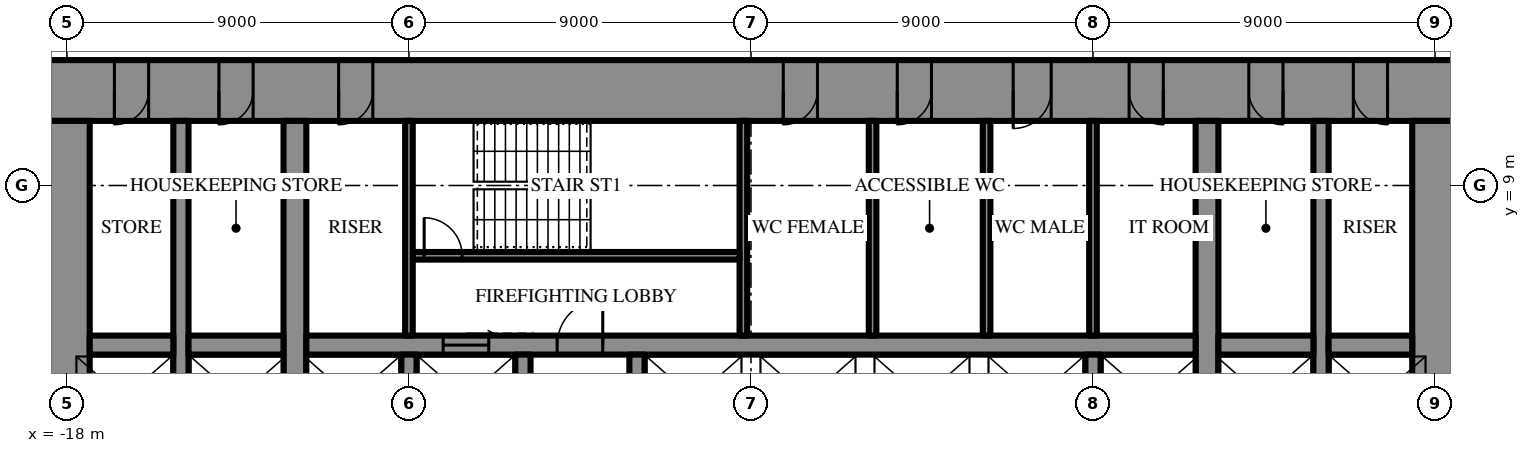
"""IFC4 building model, lengths in metres.
Left out: names, types, materials, properties, quantities, classifications, styles, units other than length and angle.
Written with IfcOpenShell. Run it as: python <this file> out.ifc"""

import sys

from ifc_helpers import new_model, si_unit, direction, frame, frame_2d, origin, place, context, subcontext, project, spatial, rectangle, extrude, element, fill, save


model = new_model("IFC4")
c1 = context("Model", 3, precision=1e-05, world=origin(), true_north=direction((0.0, 1.0)))
c2 = subcontext(c1, "Body", "Model", "MODEL_VIEW")
j1 = project(units=[si_unit("LENGTHUNIT", "METRE"), si_unit("PLANEANGLEUNIT", "RADIAN")], contexts=[c1])
p1 = place(None, origin())
s1 = spatial("IfcSite", under=j1, at=p1, CompositionType="ELEMENT")
p2 = place(p1, origin())
s2 = spatial("IfcBuilding", under=s1, at=p2, CompositionType="ELEMENT")
p3 = place(p2, frame((0.0, 0.0, 61.3)))
s3 = spatial("IfcBuildingStorey", under=s2, at=p3, CompositionType="ELEMENT", Elevation=61.3)
p4 = place(p3, frame((-18.6, 11.5, 0.0), z_axis=(0.0, 0.0, 1.0), x_axis=(1.0, 0.0, 0.0)))
e1 = element("IfcWall", 1, at=p4, inside=s3, PredefinedType="SHEAR", context=c2, shape_type="SweptSolid", body=[
    extrude(rectangle(XDim=37.2, YDim=1.6, at=frame_2d((18.6, 0.0))), origin(), (0.0, 0.0, 1.0), 4.2),
])
p5 = place(p4, frame((19.45, 0.0, 0.0)))
e2 = element("IfcOpeningElement", 2, at=p5, cuts=e1, PredefinedType="OPENING", context=c2, shape_type="SweptSolid", body=[
    extrude(rectangle(XDim=0.9, YDim=2.2, at=frame_2d((0.45, 1.1))), frame((0.0, 0.81, 0.0), z_axis=(0.0, -1.0, 0.0), x_axis=(1.0, 0.0, 0.0)), (0.0, 0.0, 1.0), 1.62),
])
p6 = place(p4, frame((22.45, 0.0, 0.0)))
e3 = element("IfcOpeningElement", 3, at=p6, cuts=e1, PredefinedType="OPENING", context=c2, shape_type="SweptSolid", body=[
    extrude(rectangle(XDim=0.9, YDim=2.2, at=frame_2d((0.45, 1.1))), frame((0.0, 0.81, 0.0), z_axis=(0.0, -1.0, 0.0), x_axis=(1.0, 0.0, 0.0)), (0.0, 0.0, 1.0), 1.62),
])
p7 = place(p4, frame((25.5, 0.0, 0.0)))
e4 = element("IfcOpeningElement", 4, at=p7, cuts=e1, PredefinedType="OPENING", context=c2, shape_type="SweptSolid", body=[
    extrude(rectangle(XDim=1.0, YDim=2.2, at=frame_2d((0.5, 1.1))), frame((0.0, 0.81, 0.0), z_axis=(0.0, -1.0, 0.0), x_axis=(1.0, 0.0, 0.0)), (0.0, 0.0, 1.0), 1.62),
])
p8 = place(p4, frame((1.85, 0.0, 0.0)))
e5 = element("IfcOpeningElement", 5, at=p8, cuts=e1, PredefinedType="OPENING", context=c2, shape_type="SweptSolid", body=[
    extrude(rectangle(XDim=0.9, YDim=2.2, at=frame_2d((0.45, 1.1))), frame((0.0, 0.81, 0.0), z_axis=(0.0, -1.0, 0.0), x_axis=(1.0, 0.0, 0.0)), (0.0, 0.0, 1.0), 1.62),
])
p9 = place(p4, frame((4.6, 0.0, 0.0)))
e6 = element("IfcOpeningElement", 6, at=p9, cuts=e1, PredefinedType="OPENING", context=c2, shape_type="SweptSolid", body=[
    extrude(rectangle(XDim=0.9, YDim=2.2, at=frame_2d((0.45, 1.1))), frame((0.0, 0.81, 0.0), z_axis=(0.0, -1.0, 0.0), x_axis=(1.0, 0.0, 0.0)), (0.0, 0.0, 1.0), 1.62),
])
p10 = place(p4, frame((7.75, 0.0, 0.0)))
e7 = element("IfcOpeningElement", 7, at=p10, cuts=e1, PredefinedType="OPENING", context=c2, shape_type="SweptSolid", body=[
    extrude(rectangle(XDim=0.9, YDim=2.2, at=frame_2d((0.45, 1.1))), frame((0.0, 0.81, 0.0), z_axis=(0.0, -1.0, 0.0), x_axis=(1.0, 0.0, 0.0)), (0.0, 0.0, 1.0), 1.62),
])
p11 = place(p4, frame((28.55, 0.0, 0.0)))
e8 = element("IfcOpeningElement", 8, at=p11, cuts=e1, PredefinedType="OPENING", context=c2, shape_type="SweptSolid", body=[
    extrude(rectangle(XDim=0.9, YDim=2.2, at=frame_2d((0.45, 1.1))), frame((0.0, 0.81, 0.0), z_axis=(0.0, -1.0, 0.0), x_axis=(1.0, 0.0, 0.0)), (0.0, 0.0, 1.0), 1.62),
])
p12 = place(p4, frame((31.7, 0.0, 0.0)))
e9 = element("IfcOpeningElement", 9, at=p12, cuts=e1, PredefinedType="OPENING", context=c2, shape_type="SweptSolid", body=[
    extrude(rectangle(XDim=0.9, YDim=2.2, at=frame_2d((0.45, 1.1))), frame((0.0, 0.81, 0.0), z_axis=(0.0, -1.0, 0.0), x_axis=(1.0, 0.0, 0.0)), (0.0, 0.0, 1.0), 1.62),
])
p13 = place(p4, frame((34.45, 0.0, 0.0)))
e10 = element("IfcOpeningElement", 10, at=p13, cuts=e1, PredefinedType="OPENING", context=c2, shape_type="SweptSolid", body=[
    extrude(rectangle(XDim=0.9, YDim=2.2, at=frame_2d((0.45, 1.1))), frame((0.0, 0.81, 0.0), z_axis=(0.0, -1.0, 0.0), x_axis=(1.0, 0.0, 0.0)), (0.0, 0.0, 1.0), 1.62),
])
p14 = place(p3, frame((18.0, -10.7, 0.0), z_axis=(0.0, 0.0, 1.0), x_axis=(0.0, 1.0, 0.0)))
e11 = element("IfcWall", 11, at=p14, inside=s3, PredefinedType="SHEAR", context=c2, shape_type="SweptSolid", body=[
    extrude(rectangle(XDim=21.4, YDim=1.2, at=frame_2d((10.7, 0.0))), origin(), (0.0, 0.0, 1.0), 4.2),
])
p15 = place(p14, frame((9.8, 0.0, 0.0)))
e12 = element("IfcOpeningElement", 12, at=p15, cuts=e11, PredefinedType="OPENING", context=c2, shape_type="SweptSolid", body=[
    extrude(rectangle(XDim=1.8, YDim=2.4, at=frame_2d((0.9, 1.2))), frame((0.0, 0.61, 0.0), z_axis=(0.0, -1.0, 0.0), x_axis=(1.0, 0.0, 0.0)), (0.0, 0.0, 1.0), 1.22),
])
p16 = place(p3, frame((-18.0, 10.7, 0.0), z_axis=(0.0, 0.0, 1.0), x_axis=(0.0, -1.0, 0.0)))
e13 = element("IfcWall", 13, at=p16, inside=s3, PredefinedType="SHEAR", context=c2, shape_type="SweptSolid", body=[
    extrude(rectangle(XDim=21.4, YDim=1.2, at=frame_2d((10.7, 0.0))), origin(), (0.0, 0.0, 1.0), 4.2),
])
p17 = place(p16, frame((9.8, 0.0, 0.0)))
e14 = element("IfcOpeningElement", 14, at=p17, cuts=e13, PredefinedType="OPENING", context=c2, shape_type="SweptSolid", body=[
    extrude(rectangle(XDim=1.8, YDim=2.4, at=frame_2d((0.9, 1.2))), frame((0.0, 0.61, 0.0), z_axis=(0.0, -1.0, 0.0), x_axis=(1.0, 0.0, 0.0)), (0.0, 0.0, 1.0), 1.22),
])
p18 = place(p3, frame((12.0, -10.7, 0.0), z_axis=(0.0, 0.0, 1.0), x_axis=(0.0, 1.0, 0.0)))
e15 = element("IfcWall", 15, at=p18, inside=s3, PredefinedType="SHEAR", context=c2, shape_type="SweptSolid", body=[
    extrude(rectangle(XDim=21.4, YDim=0.6, at=frame_2d((10.7, 0.0))), origin(), (0.0, 0.0, 1.0), 4.2),
])
p19 = place(p18, frame((9.8, 0.0, 0.0)))
e16 = element("IfcOpeningElement", 16, at=p19, cuts=e15, PredefinedType="OPENING", context=c2, shape_type="SweptSolid", body=[
    extrude(rectangle(XDim=1.8, YDim=2.4, at=frame_2d((0.9, 1.2))), frame((0.0, 0.31, 0.0), z_axis=(0.0, -1.0, 0.0), x_axis=(1.0, 0.0, 0.0)), (0.0, 0.0, 1.0), 0.62),
])
p20 = place(p3, frame((-12.0, -10.7, 0.0), z_axis=(0.0, 0.0, 1.0), x_axis=(0.0, 1.0, 0.0)))
e17 = element("IfcWall", 17, at=p20, inside=s3, PredefinedType="SHEAR", context=c2, shape_type="SweptSolid", body=[
    extrude(rectangle(XDim=21.4, YDim=0.6, at=frame_2d((10.7, 0.0))), origin(), (0.0, 0.0, 1.0), 4.2),
])
p21 = place(p20, frame((9.8, 0.0, 0.0)))
e18 = element("IfcOpeningElement", 18, at=p21, cuts=e17, PredefinedType="OPENING", context=c2, shape_type="SweptSolid", body=[
    extrude(rectangle(XDim=1.8, YDim=2.4, at=frame_2d((0.9, 1.2))), frame((0.0, 0.31, 0.0), z_axis=(0.0, -1.0, 0.0), x_axis=(1.0, 0.0, 0.0)), (0.0, 0.0, 1.0), 0.62),
])
p22 = place(p3, frame((15.0, -10.7, 0.0), z_axis=(0.0, 0.0, 1.0), x_axis=(0.0, 1.0, 0.0)))
e19 = element("IfcWall", 19, at=p22, inside=s3, PredefinedType="SHEAR", context=c2, shape_type="SweptSolid", body=[
    extrude(rectangle(XDim=21.4, YDim=0.4, at=frame_2d((10.7, 0.0))), origin(), (0.0, 0.0, 1.0), 4.2),
])
p23 = place(p22, frame((9.8, 0.0, 0.0)))
e20 = element("IfcOpeningElement", 20, at=p23, cuts=e19, PredefinedType="OPENING", context=c2, shape_type="SweptSolid", body=[
    extrude(rectangle(XDim=1.8, YDim=2.4, at=frame_2d((0.9, 1.2))), frame((0.0, 0.21, 0.0), z_axis=(0.0, -1.0, 0.0), x_axis=(1.0, 0.0, 0.0)), (0.0, 0.0, 1.0), 0.42),
])
p24 = place(p3, frame((-15.0, -10.7, 0.0), z_axis=(0.0, 0.0, 1.0), x_axis=(0.0, 1.0, 0.0)))
e21 = element("IfcWall", 21, at=p24, inside=s3, PredefinedType="SHEAR", context=c2, shape_type="SweptSolid", body=[
    extrude(rectangle(XDim=21.4, YDim=0.4, at=frame_2d((10.7, 0.0))), origin(), (0.0, 0.0, 1.0), 4.2),
])
p25 = place(p24, frame((9.8, 0.0, 0.0)))
e22 = element("IfcOpeningElement", 22, at=p25, cuts=e21, PredefinedType="OPENING", context=c2, shape_type="SweptSolid", body=[
    extrude(rectangle(XDim=1.8, YDim=2.4, at=frame_2d((0.9, 1.2))), frame((0.0, 0.21, 0.0), z_axis=(0.0, -1.0, 0.0), x_axis=(1.0, 0.0, 0.0)), (0.0, 0.0, 1.0), 0.42),
])
p26 = place(p3, frame((-17.4, 4.8, 0.0), z_axis=(0.0, 0.0, 1.0), x_axis=(1.0, 0.0, 0.0)))
e23 = element("IfcWall", 23, at=p26, inside=s3, PredefinedType="SHEAR", context=c2, shape_type="SweptSolid", body=[
    extrude(rectangle(XDim=2.2, YDim=0.5, at=frame_2d((1.1, 0.0))), origin(), (0.0, 0.0, 1.0), 4.2),
])
p27 = place(p3, frame((-14.8, 4.8, 0.0), z_axis=(0.0, 0.0, 1.0), x_axis=(1.0, 0.0, 0.0)))
e24 = element("IfcWall", 24, at=p27, inside=s3, PredefinedType="SHEAR", context=c2, shape_type="SweptSolid", body=[
    extrude(rectangle(XDim=2.5, YDim=0.5, at=frame_2d((1.25, 0.0))), origin(), (0.0, 0.0, 1.0), 4.2),
])
p28 = place(p3, frame((-11.7, 4.8, 0.0), z_axis=(0.0, 0.0, 1.0), x_axis=(1.0, 0.0, 0.0)))
e25 = element("IfcWall", 25, at=p28, inside=s3, PredefinedType="SHEAR", context=c2, shape_type="SweptSolid", body=[
    extrude(rectangle(XDim=23.4, YDim=0.5, at=frame_2d((11.7, 0.0))), origin(), (0.0, 0.0, 1.0), 4.2),
])
p29 = place(p28, frame((6.6, 0.0, 0.0)))
e26 = element("IfcOpeningElement", 26, at=p29, cuts=e25, PredefinedType="OPENING", context=c2, shape_type="SweptSolid", body=[
    extrude(rectangle(XDim=1.2, YDim=2.2, at=frame_2d((0.6, 1.1))), frame((0.0, 0.26, 0.0), z_axis=(0.0, -1.0, 0.0), x_axis=(1.0, 0.0, 0.0)), (0.0, 0.0, 1.0), 0.52),
])
p30 = place(p28, frame((3.6, 0.0, 0.0)))
e27 = element("IfcOpeningElement", 27, at=p30, cuts=e25, PredefinedType="OPENING", context=c2, shape_type="SweptSolid", body=[
    extrude(rectangle(XDim=1.2, YDim=2.2, at=frame_2d((0.6, 1.1))), frame((0.0, 0.26, 0.0), z_axis=(0.0, -1.0, 0.0), x_axis=(1.0, 0.0, 0.0)), (0.0, 0.0, 1.0), 0.52),
])
p31 = place(p3, frame((12.3, 4.8, 0.0), z_axis=(0.0, 0.0, 1.0), x_axis=(1.0, 0.0, 0.0)))
e28 = element("IfcWall", 28, at=p31, inside=s3, PredefinedType="SHEAR", context=c2, shape_type="SweptSolid", body=[
    extrude(rectangle(XDim=2.5, YDim=0.5, at=frame_2d((1.25, 0.0))), origin(), (0.0, 0.0, 1.0), 4.2),
])
p32 = place(p3, frame((15.2, 4.8, 0.0), z_axis=(0.0, 0.0, 1.0), x_axis=(1.0, 0.0, 0.0)))
e29 = element("IfcWall", 29, at=p32, inside=s3, PredefinedType="SHEAR", context=c2, shape_type="SweptSolid", body=[
    extrude(rectangle(XDim=2.2, YDim=0.5, at=frame_2d((1.1, 0.0))), origin(), (0.0, 0.0, 1.0), 4.2),
])
for number, where, z_axis, x_axis in (
    (30, (-9.0, 2.25, 0.0), (0.0, 0.0, 1.0), (0.0, 1.0, 0.0)),
    (31, (-6.0, 2.25, 0.0), (0.0, 0.0, 1.0), (0.0, 1.0, 0.0)),
    (32, (-3.0, 2.25, 0.0), (0.0, 0.0, 1.0), (0.0, 1.0, 0.0)),
    (33, (9.0, 2.25, 0.0), (0.0, 0.0, 1.0), (0.0, 1.0, 0.0)),
):
    element("IfcWall", number, at=place(p3, frame(where, z_axis=z_axis, x_axis=x_axis)), inside=s3, PredefinedType="SHEAR", context=c2, shape_type="SweptSolid", body=[
        extrude(rectangle(XDim=2.3, YDim=0.4, at=frame_2d((1.15, 0.0))), origin(), (0.0, 0.0, 1.0), 4.2),
    ])
p33 = place(p3, frame((-0.2, 5.05, 0.0), z_axis=(0.0, 0.0, 1.0), x_axis=(0.0, 1.0, 0.0)))
e34 = element("IfcWall", 34, at=p33, inside=s3, PredefinedType="SHEAR", context=c2, shape_type="SweptSolid", body=[
    extrude(rectangle(XDim=5.65, YDim=0.2, at=frame_2d((2.825, 0.0))), origin(), (0.0, 0.0, 1.0), 4.2),
])
p34 = place(p3, frame((-8.9, 7.15, 0.0), z_axis=(0.0, 0.0, 1.0), x_axis=(1.0, 0.0, 0.0)))
e35 = element("IfcWall", 35, at=p34, inside=s3, PredefinedType="SHEAR", context=c2, shape_type="SweptSolid", body=[
    extrude(rectangle(XDim=8.6, YDim=0.2, at=frame_2d((4.3, 0.0))), origin(), (0.0, 0.0, 1.0), 4.2),
])
p35 = place(p34, frame((0.3, 0.0, 0.0)))
e36 = element("IfcOpeningElement", 36, at=p35, cuts=e35, PredefinedType="OPENING", context=c2, shape_type="SweptSolid", body=[
    extrude(rectangle(XDim=1.0, YDim=2.2, at=frame_2d((0.5, 1.1))), frame((0.0, 0.11, 0.0), z_axis=(0.0, -1.0, 0.0), x_axis=(1.0, 0.0, 0.0)), (0.0, 0.0, 1.0), 0.22),
])
for number, where, z_axis, x_axis in (
    (37, (-9.0, 5.05, 0.0), (0.0, 0.0, 1.0), (0.0, 1.0, 0.0)),
    (38, (9.0, 5.05, 0.0), (0.0, 0.0, 1.0), (0.0, 1.0, 0.0)),
    (39, (3.2, 5.05, 0.0), (0.0, 0.0, 1.0), (0.0, 1.0, 0.0)),
    (40, (6.2, 5.05, 0.0), (0.0, 0.0, 1.0), (0.0, 1.0, 0.0)),
):
    element("IfcWall", number, at=place(p3, frame(where, z_axis=z_axis, x_axis=x_axis)), inside=s3, PredefinedType="PARTITIONING", context=c2, shape_type="SweptSolid", body=[
        extrude(rectangle(XDim=5.65, YDim=0.2, at=frame_2d((2.825, 0.0))), origin(), (0.0, 0.0, 1.0), 4.0),
    ])
p36 = place(p29, origin())
e41 = element("IfcDoor", 41, at=p36, inside=s3, OperationType="SINGLE_SWING_LEFT", PredefinedType="DOOR", context=c2, shape_type="SweptSolid", body=[
    extrude(rectangle(XDim=1.2, YDim=2.2, at=frame_2d((0.6, 1.1))), frame((0.0, 0.025, 0.0), z_axis=(0.0, -1.0, 0.0), x_axis=(1.0, 0.0, 0.0)), (0.0, 0.0, 1.0), 0.05),
])
fill(e26, e41)
p37 = place(p35, origin())
e42 = element("IfcDoor", 42, at=p37, inside=s3, OperationType="SINGLE_SWING_RIGHT", PredefinedType="DOOR", context=c2, shape_type="SweptSolid", body=[
    extrude(rectangle(XDim=1.0, YDim=2.2, at=frame_2d((0.5, 1.1))), frame((0.0, 0.025, 0.0), z_axis=(0.0, -1.0, 0.0), x_axis=(1.0, 0.0, 0.0)), (0.0, 0.0, 1.0), 0.05),
])
fill(e36, e42)
p38 = place(p5, frame((0.9, 0.0, 0.0), z_axis=(0.0, 0.0, 1.0), x_axis=(-1.0, 0.0, 0.0)))
e43 = element("IfcDoor", 43, at=p38, inside=s3, OperationType="SINGLE_SWING_LEFT", PredefinedType="DOOR", context=c2, shape_type="SweptSolid", body=[
    extrude(rectangle(XDim=0.9, YDim=2.2, at=frame_2d((0.45, 1.1))), frame((0.0, 0.025, 0.0), z_axis=(0.0, -1.0, 0.0), x_axis=(1.0, 0.0, 0.0)), (0.0, 0.0, 1.0), 0.05),
])
fill(e2, e43)
p39 = place(p6, frame((0.9, 0.0, 0.0), z_axis=(0.0, 0.0, 1.0), x_axis=(-1.0, 0.0, 0.0)))
e44 = element("IfcDoor", 44, at=p39, inside=s3, OperationType="SINGLE_SWING_LEFT", PredefinedType="DOOR", context=c2, shape_type="SweptSolid", body=[
    extrude(rectangle(XDim=0.9, YDim=2.2, at=frame_2d((0.45, 1.1))), frame((0.0, 0.025, 0.0), z_axis=(0.0, -1.0, 0.0), x_axis=(1.0, 0.0, 0.0)), (0.0, 0.0, 1.0), 0.05),
])
fill(e3, e44)
p40 = place(p7, frame((1.0, 0.0, 0.0), z_axis=(0.0, 0.0, 1.0), x_axis=(-1.0, 0.0, 0.0)))
e45 = element("IfcDoor", 45, at=p40, inside=s3, OperationType="SINGLE_SWING_LEFT", PredefinedType="DOOR", context=c2, shape_type="SweptSolid", body=[
    extrude(rectangle(XDim=1.0, YDim=2.2, at=frame_2d((0.5, 1.1))), frame((0.0, 0.025, 0.0), z_axis=(0.0, -1.0, 0.0), x_axis=(1.0, 0.0, 0.0)), (0.0, 0.0, 1.0), 0.05),
])
fill(e4, e45)
p41 = place(p8, frame((0.9, 0.0, 0.0), z_axis=(0.0, 0.0, 1.0), x_axis=(-1.0, 0.0, 0.0)))
e46 = element("IfcDoor", 46, at=p41, inside=s3, OperationType="SINGLE_SWING_LEFT", PredefinedType="DOOR", context=c2, shape_type="SweptSolid", body=[
    extrude(rectangle(XDim=0.9, YDim=2.2, at=frame_2d((0.45, 1.1))), frame((0.0, 0.025, 0.0), z_axis=(0.0, -1.0, 0.0), x_axis=(1.0, 0.0, 0.0)), (0.0, 0.0, 1.0), 0.05),
])
fill(e5, e46)
p42 = place(p9, frame((0.9, 0.0, 0.0), z_axis=(0.0, 0.0, 1.0), x_axis=(-1.0, 0.0, 0.0)))
e47 = element("IfcDoor", 47, at=p42, inside=s3, OperationType="SINGLE_SWING_LEFT", PredefinedType="DOOR", context=c2, shape_type="SweptSolid", body=[
    extrude(rectangle(XDim=0.9, YDim=2.2, at=frame_2d((0.45, 1.1))), frame((0.0, 0.025, 0.0), z_axis=(0.0, -1.0, 0.0), x_axis=(1.0, 0.0, 0.0)), (0.0, 0.0, 1.0), 0.05),
])
fill(e6, e47)
p43 = place(p10, frame((0.9, 0.0, 0.0), z_axis=(0.0, 0.0, 1.0), x_axis=(-1.0, 0.0, 0.0)))
e48 = element("IfcDoor", 48, at=p43, inside=s3, OperationType="SINGLE_SWING_LEFT", PredefinedType="DOOR", context=c2, shape_type="SweptSolid", body=[
    extrude(rectangle(XDim=0.9, YDim=2.2, at=frame_2d((0.45, 1.1))), frame((0.0, 0.025, 0.0), z_axis=(0.0, -1.0, 0.0), x_axis=(1.0, 0.0, 0.0)), (0.0, 0.0, 1.0), 0.05),
])
fill(e7, e48)
p44 = place(p11, frame((0.9, 0.0, 0.0), z_axis=(0.0, 0.0, 1.0), x_axis=(-1.0, 0.0, 0.0)))
e49 = element("IfcDoor", 49, at=p44, inside=s3, OperationType="SINGLE_SWING_RIGHT", PredefinedType="DOOR", context=c2, shape_type="SweptSolid", body=[
    extrude(rectangle(XDim=0.9, YDim=2.2, at=frame_2d((0.45, 1.1))), frame((0.0, 0.025, 0.0), z_axis=(0.0, -1.0, 0.0), x_axis=(1.0, 0.0, 0.0)), (0.0, 0.0, 1.0), 0.05),
])
fill(e8, e49)
p45 = place(p12, frame((0.9, 0.0, 0.0), z_axis=(0.0, 0.0, 1.0), x_axis=(-1.0, 0.0, 0.0)))
e50 = element("IfcDoor", 50, at=p45, inside=s3, OperationType="SINGLE_SWING_RIGHT", PredefinedType="DOOR", context=c2, shape_type="SweptSolid", body=[
    extrude(rectangle(XDim=0.9, YDim=2.2, at=frame_2d((0.45, 1.1))), frame((0.0, 0.025, 0.0), z_axis=(0.0, -1.0, 0.0), x_axis=(1.0, 0.0, 0.0)), (0.0, 0.0, 1.0), 0.05),
])
fill(e9, e50)
p46 = place(p13, frame((0.9, 0.0, 0.0), z_axis=(0.0, 0.0, 1.0), x_axis=(-1.0, 0.0, 0.0)))
e51 = element("IfcDoor", 51, at=p46, inside=s3, OperationType="SINGLE_SWING_RIGHT", PredefinedType="DOOR", context=c2, shape_type="SweptSolid", body=[
    extrude(rectangle(XDim=0.9, YDim=2.2, at=frame_2d((0.45, 1.1))), frame((0.0, 0.025, 0.0), z_axis=(0.0, -1.0, 0.0), x_axis=(1.0, 0.0, 0.0)), (0.0, 0.0, 1.0), 0.05),
])
fill(e10, e51)
p47 = place(p30, origin())
e52 = element("IfcDoor", 52, at=p47, inside=s3, OperationType="SLIDING_TO_LEFT", PredefinedType="DOOR", context=c2, shape_type="SweptSolid", body=[
    extrude(rectangle(XDim=1.2, YDim=2.2, at=frame_2d((0.6, 1.1))), frame((0.0, 0.025, 0.0), z_axis=(0.0, -1.0, 0.0), x_axis=(1.0, 0.0, 0.0)), (0.0, 0.0, 1.0), 0.05),
])
fill(e27, e52)
save(model, sys.argv[1])
